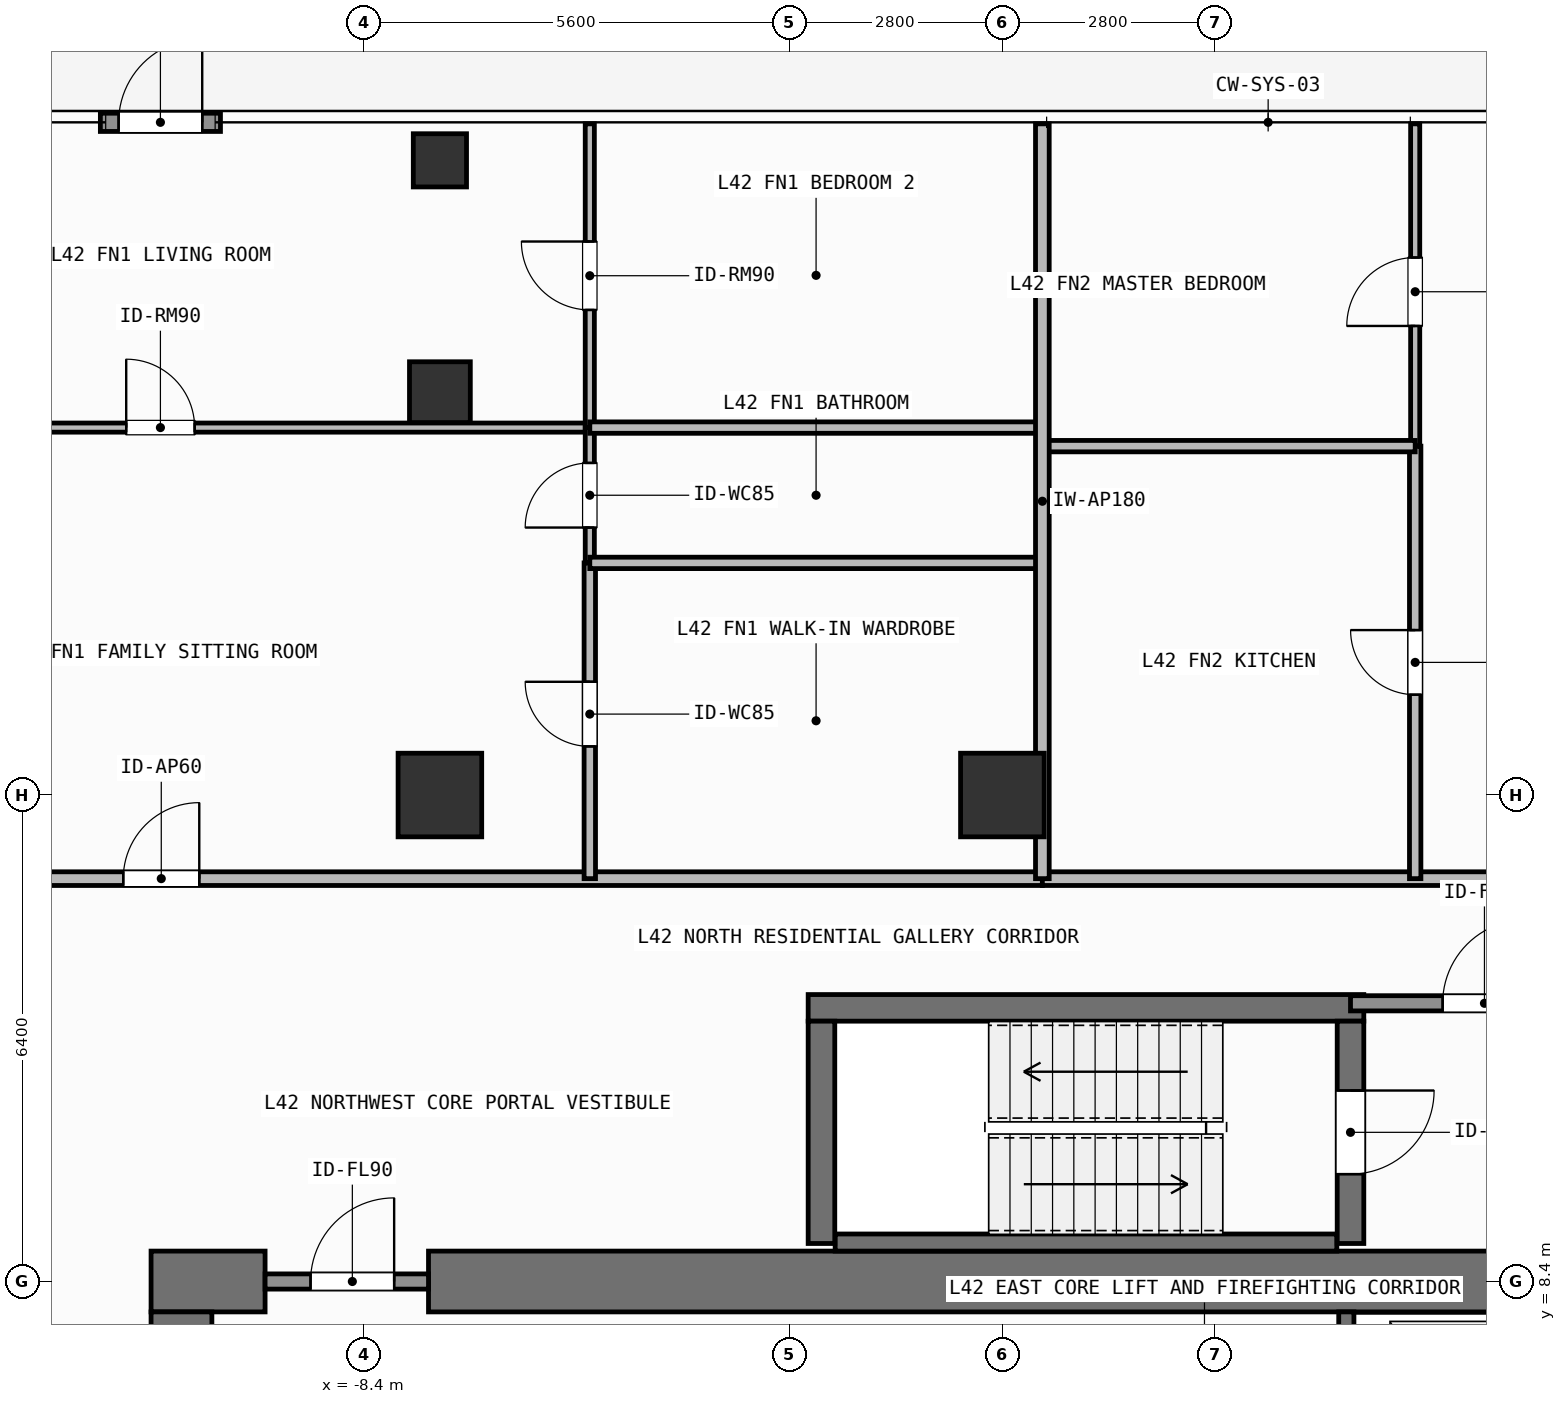
"""IFC4 building model, lengths in metres.
Left out: names, types, materials, properties, quantities, classifications, styles, units other than length and angle.
Written with IfcOpenShell. Run it as: python <this file> out.ifc"""

import sys

from ifc_helpers import new_model, si_unit, direction, frame, frame_2d, origin, origin_2d, place, context, subcontext, project, spatial, rectangle, hollow_rectangle, extrude, element, fill, save


model = new_model("IFC4")
c1 = context("Model", 3, precision=1e-05, world=origin(), true_north=direction((0.0, 1.0)))
c2 = subcontext(c1, "Body", "Model", "MODEL_VIEW")
j1 = project(units=[si_unit("LENGTHUNIT", "METRE"), si_unit("PLANEANGLEUNIT", "RADIAN")], contexts=[c1])
p1 = place(None, origin())
s1 = spatial("IfcSite", under=j1, at=p1, CompositionType="ELEMENT")
p2 = place(p1, origin())
s2 = spatial("IfcBuilding", under=s1, at=p2, CompositionType="ELEMENT")
p3 = place(p2, frame((0.0, 0.0, 171.9)))
s3 = spatial("IfcBuildingStorey", under=s2, at=p3, CompositionType="ELEMENT", Elevation=171.9)
p4 = place(p3, frame((-11.2, 8.4, 0.0), z_axis=(0.0, 0.0, 1.0), x_axis=(1.0, 0.0, 0.0)))
e1 = element("IfcWall", 1, at=p4, inside=s3, PredefinedType="SHEAR", context=c2, shape_type="SweptSolid", body=[
    extrude(rectangle(XDim=1.5, YDim=0.8, at=frame_2d((0.75, 0.0))), origin(), (0.0, 0.0, 1.0), 3.9),
])
p5 = place(p3, frame((-7.55, 8.4, 0.0), z_axis=(0.0, 0.0, 1.0), x_axis=(1.0, 0.0, 0.0)))
e2 = element("IfcWall", 2, at=p5, inside=s3, PredefinedType="SHEAR", context=c2, shape_type="SweptSolid", body=[
    extrude(rectangle(XDim=16.35, YDim=0.8, at=frame_2d((8.175, 0.0))), origin(), (0.0, 0.0, 1.0), 3.9),
])
p6 = place(p3, frame((-10.8, -8.0, 0.0), z_axis=(0.0, 0.0, 1.0), x_axis=(0.0, 1.0, 0.0)))
e3 = element("IfcWall", 3, at=p6, inside=s3, PredefinedType="SHEAR", context=c2, shape_type="SweptSolid", body=[
    extrude(rectangle(XDim=16.0, YDim=0.8, at=frame_2d((8.0, 0.0))), origin(), (0.0, 0.0, 1.0), 3.9),
])
p7 = place(p3, frame((-2.555, 12.0, 0.0), z_axis=(0.0, 0.0, 1.0), x_axis=(1.0, 0.0, 0.0)))
e4 = element("IfcWall", 4, at=p7, inside=s3, PredefinedType="SHEAR", context=c2, shape_type="SweptSolid", body=[
    extrude(rectangle(XDim=7.31, YDim=0.35, at=frame_2d((3.655, 0.0))), origin(), (0.0, 0.0, 1.0), 3.9),
])
p8 = place(p3, frame((-2.2, 8.913, 0.0), z_axis=(0.0, 0.0, 1.0), x_axis=(1.0, 0.0, 0.0)))
e5 = element("IfcWall", 5, at=p8, inside=s3, PredefinedType="SHEAR", context=c2, shape_type="SweptSolid", body=[
    extrude(rectangle(XDim=6.6, YDim=0.225, at=frame_2d((3.3, 0.0))), origin(), (0.0, 0.0, 1.0), 3.9),
])
p9 = place(p3, frame((-2.38, 8.9, 0.0), z_axis=(0.0, 0.0, 1.0), x_axis=(0.0, 1.0, 0.0)))
e6 = element("IfcWall", 6, at=p9, inside=s3, PredefinedType="SHEAR", context=c2, shape_type="SweptSolid", body=[
    extrude(rectangle(XDim=2.925, YDim=0.35, at=frame_2d((1.462, 0.0))), origin(), (0.0, 0.0, 1.0), 3.9),
])
p10 = place(p3, frame((4.58, 11.825, 0.0), z_axis=(0.0, 0.0, 1.0), x_axis=(0.0, -1.0, 0.0)))
e7 = element("IfcWall", 7, at=p10, inside=s3, PredefinedType="SHEAR", context=c2, shape_type="SweptSolid", body=[
    extrude(rectangle(XDim=2.925, YDim=0.35, at=frame_2d((1.462, 0.0))), origin(), (0.0, 0.0, 1.0), 3.9),
])
p11 = place(p10, frame((0.913, 0.0, 0.0)))
e8 = element("IfcOpeningElement", 8, at=p11, cuts=e7, PredefinedType="OPENING", context=c2, shape_type="SweptSolid", body=[
    extrude(rectangle(XDim=1.1, YDim=2.15, at=frame_2d((0.55, 1.075))), frame((0.0, 0.185, 0.0), z_axis=(0.0, -1.0, 0.0), x_axis=(1.0, 0.0, 0.0)), (0.0, 0.0, 1.0), 0.37),
])
for number, where, z_axis, x_axis in (
    (9, (-7.4, 14.8, 0.0), (0.0, 0.0, 1.0), (1.0, 0.0, 0.0)),
    (10, (0.0, 14.8, 0.0), (0.0, 0.0, 1.0), (1.0, 0.0, 0.0)),
):
    element("IfcColumn", number, at=place(p3, frame(where, z_axis=z_axis, x_axis=x_axis)), inside=s3, PredefinedType="COLUMN", context=c2, shape_type="SweptSolid", body=[
        extrude(rectangle(XDim=1.1, YDim=1.1, at=origin_2d()), origin(), (0.0, 0.0, 1.0), 3.9),
    ])
p12 = place(p3, frame((-7.4, 20.1, 0.0), z_axis=(0.0, 0.0, 1.0), x_axis=(1.0, 0.0, 0.0)))
e11 = element("IfcColumn", 11, at=p12, inside=s3, PredefinedType="COLUMN", context=c2, shape_type="SweptSolid", body=[
    extrude(hollow_rectangle(XDim=0.8, YDim=0.8, WallThickness=0.036, at=origin_2d()), origin(), (0.0, 0.0, 1.0), 3.9),
])
p13 = place(p3, frame((-7.4, 23.15, 0.0), z_axis=(0.0, 0.0, 1.0), x_axis=(1.0, 0.0, 0.0)))
e12 = element("IfcColumn", 12, at=p13, inside=s3, PredefinedType="COLUMN", context=c2, shape_type="SweptSolid", body=[
    extrude(hollow_rectangle(XDim=0.7, YDim=0.7, WallThickness=0.032, at=origin_2d()), origin(), (0.0, 0.0, 1.0), 3.9),
])
p14 = place(p3, frame((-11.867, 23.65, 0.0), z_axis=(0.0, 0.0, 1.0), x_axis=(1.0, 0.0, 0.0)))
e13 = element("IfcWall", 13, at=p14, inside=s3, PredefinedType="SOLIDWALL", context=c2, shape_type="SweptSolid", body=[
    extrude(rectangle(XDim=1.58, YDim=0.24, at=frame_2d((0.79, 0.0))), origin(), (0.0, 0.0, 1.0), 3.68),
])
p15 = place(p14, frame((0.24, 0.0, 0.0)))
e14 = element("IfcOpeningElement", 14, at=p15, cuts=e13, PredefinedType="OPENING", context=c2, shape_type="SweptSolid", body=[
    extrude(rectangle(XDim=1.1, YDim=2.2, at=frame_2d((0.55, 1.1))), frame((0.0, 0.13, 0.0), z_axis=(0.0, -1.0, 0.0), x_axis=(1.0, 0.0, 0.0)), (0.0, 0.0, 1.0), 0.26),
])
p16 = place(p3, frame((4.525, 5.825, 0.0), z_axis=(0.0, 0.0, 1.0), x_axis=(0.0, 1.0, 0.0)))
e15 = element("IfcWall", 15, at=p16, inside=s3, PredefinedType="SHEAR", context=c2, shape_type="SweptSolid", body=[
    extrude(rectangle(XDim=2.175, YDim=0.2, at=frame_2d((1.087, 0.0))), origin(), (0.0, 0.0, 1.0), 3.68),
])
p17 = place(p16, frame((0.425, 0.0, 0.0)))
e16 = element("IfcOpeningElement", 16, at=p17, cuts=e15, PredefinedType="OPENING", context=c2, shape_type="SweptSolid", body=[
    extrude(rectangle(XDim=1.1, YDim=2.2, at=frame_2d((0.55, 1.1))), frame((0.0, 0.11, 0.0), z_axis=(0.0, -1.0, 0.0), x_axis=(1.0, 0.0, 0.0)), (0.0, 0.0, 1.0), 0.22),
])
p18 = place(p3, frame((4.58, 12.06, 0.0), z_axis=(0.0, 0.0, 1.0), x_axis=(1.0, 0.0, 0.0)))
e17 = element("IfcWall", 17, at=p18, inside=s3, PredefinedType="SOLIDWALL", context=c2, shape_type="SweptSolid", body=[
    extrude(rectangle(XDim=3.7, YDim=0.2, at=frame_2d((1.85, 0.0))), origin(), (0.0, 0.0, 1.0), 3.68),
])
p19 = place(p18, frame((1.212, 0.0, 0.0)))
e18 = element("IfcOpeningElement", 18, at=p19, cuts=e17, PredefinedType="OPENING", context=c2, shape_type="SweptSolid", body=[
    extrude(rectangle(XDim=1.1, YDim=2.15, at=frame_2d((0.55, 1.075))), frame((0.0, 0.11, 0.0), z_axis=(0.0, -1.0, 0.0), x_axis=(1.0, 0.0, 0.0)), (0.0, 0.0, 1.0), 0.22),
])
p20 = place(p3, frame((-9.7, 8.4, 0.0), z_axis=(0.0, 0.0, 1.0), x_axis=(1.0, 0.0, 0.0)))
e19 = element("IfcWall", 19, at=p20, inside=s3, PredefinedType="SOLIDWALL", context=c2, shape_type="SweptSolid", body=[
    extrude(rectangle(XDim=2.15, YDim=0.2, at=frame_2d((1.075, 0.0))), origin(), (0.0, 0.0, 1.0), 2.82),
])
p21 = place(p20, frame((0.598, 0.0, 0.0)))
e20 = element("IfcOpeningElement", 20, at=p21, cuts=e19, PredefinedType="OPENING", context=c2, shape_type="SweptSolid", body=[
    extrude(rectangle(XDim=1.1, YDim=2.15, at=frame_2d((0.55, 1.075))), frame((0.0, 0.11, 0.0), z_axis=(0.0, -1.0, 0.0), x_axis=(1.0, 0.0, 0.0)), (0.0, 0.0, 1.0), 0.22),
])
p22 = place(p3, frame((-22.12, 13.7, 0.0), z_axis=(0.0, 0.0, 1.0), x_axis=(1.0, 0.0, 0.0)))
e21 = element("IfcWall", 21, at=p22, inside=s3, PredefinedType="PARTITIONING", context=c2, shape_type="SweptSolid", body=[
    extrude(rectangle(XDim=22.646, YDim=0.18, at=frame_2d((11.323, 0.0))), origin(), (0.0, 0.0, 1.0), 3.68),
])
p23 = place(p22, frame((10.554, 0.0, 0.0)))
e22 = element("IfcOpeningElement", 22, at=p23, cuts=e21, PredefinedType="OPENING", context=c2, shape_type="SweptSolid", body=[
    extrude(rectangle(XDim=1.0, YDim=2.2, at=frame_2d((0.5, 1.1))), frame((0.0, 0.1, 0.0), z_axis=(0.0, -1.0, 0.0), x_axis=(1.0, 0.0, 0.0)), (0.0, 0.0, 1.0), 0.2),
])
p24 = place(p3, frame((-16.726, 19.634, 0.0), z_axis=(0.0, 0.0, 1.0), x_axis=(1.0, 0.0, 0.0)))
e23 = element("IfcWall", 23, at=p24, inside=s3, PredefinedType="PARTITIONING", context=c2, shape_type="SweptSolid", body=[
    extrude(rectangle(XDim=11.298, YDim=0.12, at=frame_2d((5.649, 0.0))), origin(), (0.0, 0.0, 1.0), 3.68),
])
p25 = place(p24, frame((5.199, 0.0, 0.0)))
e24 = element("IfcOpeningElement", 24, at=p25, cuts=e23, PredefinedType="OPENING", context=c2, shape_type="SweptSolid", body=[
    extrude(rectangle(XDim=0.9, YDim=2.1, at=frame_2d((0.45, 1.05))), frame((0.0, 0.07, 0.0), z_axis=(0.0, -1.0, 0.0), x_axis=(1.0, 0.0, 0.0)), (0.0, 0.0, 1.0), 0.14),
])
p26 = place(p3, frame((-5.428, 13.7, 0.0), z_axis=(0.0, 0.0, 1.0), x_axis=(0.0, 1.0, 0.0)))
e25 = element("IfcWall", 25, at=p26, inside=s3, PredefinedType="PARTITIONING", context=c2, shape_type="SweptSolid", body=[
    extrude(rectangle(XDim=4.154, YDim=0.15, at=frame_2d((2.077, 0.0))), origin(), (0.0, 0.0, 1.0), 3.68),
])
p27 = place(p26, frame((1.74, 0.0, 0.0)))
e26 = element("IfcOpeningElement", 26, at=p27, cuts=e25, PredefinedType="OPENING", context=c2, shape_type="SweptSolid", body=[
    extrude(rectangle(XDim=0.85, YDim=2.1, at=frame_2d((0.425, 1.05))), frame((0.0, 0.085, 0.0), z_axis=(0.0, -1.0, 0.0), x_axis=(1.0, 0.0, 0.0)), (0.0, 0.0, 1.0), 0.17),
])
p28 = place(p3, frame((-5.428, 17.854, 0.0), z_axis=(0.0, 0.0, 1.0), x_axis=(0.0, 1.0, 0.0)))
e27 = element("IfcWall", 27, at=p28, inside=s3, PredefinedType="PARTITIONING", context=c2, shape_type="SweptSolid", body=[
    extrude(rectangle(XDim=1.78, YDim=0.12, at=frame_2d((0.89, 0.0))), origin(), (0.0, 0.0, 1.0), 3.68),
])
p29 = place(p28, frame((0.465, 0.0, 0.0)))
e28 = element("IfcOpeningElement", 28, at=p29, cuts=e27, PredefinedType="OPENING", context=c2, shape_type="SweptSolid", body=[
    extrude(rectangle(XDim=0.85, YDim=2.1, at=frame_2d((0.425, 1.05))), frame((0.0, 0.07, 0.0), z_axis=(0.0, -1.0, 0.0), x_axis=(1.0, 0.0, 0.0)), (0.0, 0.0, 1.0), 0.14),
])
p30 = place(p3, frame((-5.428, 19.634, 0.0), z_axis=(0.0, 0.0, 1.0), x_axis=(0.0, 1.0, 0.0)))
e29 = element("IfcWall", 29, at=p30, inside=s3, PredefinedType="PARTITIONING", context=c2, shape_type="SweptSolid", body=[
    extrude(rectangle(XDim=3.996, YDim=0.12, at=frame_2d((1.998, 0.0))), origin(), (0.0, 0.0, 1.0), 3.68),
])
p31 = place(p30, frame((1.548, 0.0, 0.0)))
e30 = element("IfcOpeningElement", 30, at=p31, cuts=e29, PredefinedType="OPENING", context=c2, shape_type="SweptSolid", body=[
    extrude(rectangle(XDim=0.9, YDim=2.1, at=frame_2d((0.45, 1.05))), frame((0.0, 0.07, 0.0), z_axis=(0.0, -1.0, 0.0), x_axis=(1.0, 0.0, 0.0)), (0.0, 0.0, 1.0), 0.14),
])
p32 = place(p3, frame((0.526, 13.7, 0.0), z_axis=(0.0, 0.0, 1.0), x_axis=(1.0, 0.0, 0.0)))
e31 = element("IfcWall", 31, at=p32, inside=s3, PredefinedType="PARTITIONING", context=c2, shape_type="SweptSolid", body=[
    extrude(rectangle(XDim=17.794, YDim=0.18, at=frame_2d((8.897, 0.0))), origin(), (0.0, 0.0, 1.0), 3.68),
])
p33 = place(p32, frame((8.039, 0.0, 0.0)))
e32 = element("IfcOpeningElement", 32, at=p33, cuts=e31, PredefinedType="OPENING", context=c2, shape_type="SweptSolid", body=[
    extrude(rectangle(XDim=1.0, YDim=2.2, at=frame_2d((0.5, 1.1))), frame((0.0, 0.1, 0.0), z_axis=(0.0, -1.0, 0.0), x_axis=(1.0, 0.0, 0.0)), (0.0, 0.0, 1.0), 0.2),
])
p34 = place(p3, frame((5.431, 13.7, 0.0), z_axis=(0.0, 0.0, 1.0), x_axis=(0.0, 1.0, 0.0)))
e33 = element("IfcWall", 33, at=p34, inside=s3, PredefinedType="PARTITIONING", context=c2, shape_type="SweptSolid", body=[
    extrude(rectangle(XDim=5.69, YDim=0.15, at=frame_2d((2.845, 0.0))), origin(), (0.0, 0.0, 1.0), 3.68),
])
p35 = place(p34, frame((2.42, 0.0, 0.0)))
e34 = element("IfcOpeningElement", 34, at=p35, cuts=e33, PredefinedType="OPENING", context=c2, shape_type="SweptSolid", body=[
    extrude(rectangle(XDim=0.85, YDim=2.1, at=frame_2d((0.425, 1.05))), frame((0.0, 0.085, 0.0), z_axis=(0.0, -1.0, 0.0), x_axis=(1.0, 0.0, 0.0)), (0.0, 0.0, 1.0), 0.17),
])
p36 = place(p3, frame((5.431, 19.39, 0.0), z_axis=(0.0, 0.0, 1.0), x_axis=(0.0, 1.0, 0.0)))
e35 = element("IfcWall", 35, at=p36, inside=s3, PredefinedType="PARTITIONING", context=c2, shape_type="SweptSolid", body=[
    extrude(rectangle(XDim=4.24, YDim=0.12, at=frame_2d((2.12, 0.0))), origin(), (0.0, 0.0, 1.0), 3.68),
])
p37 = place(p36, frame((1.581, 0.0, 0.0)))
e36 = element("IfcOpeningElement", 36, at=p37, cuts=e35, PredefinedType="OPENING", context=c2, shape_type="SweptSolid", body=[
    extrude(rectangle(XDim=0.9, YDim=2.1, at=frame_2d((0.45, 1.05))), frame((0.0, 0.07, 0.0), z_axis=(0.0, -1.0, 0.0), x_axis=(1.0, 0.0, 0.0)), (0.0, 0.0, 1.0), 0.14),
])
for number, where, z_axis, x_axis in (
    (37, (-5.428, 17.854, 0.0), (0.0, 0.0, 1.0), (1.0, 0.0, 0.0)),
    (38, (-5.428, 19.634, 0.0), (0.0, 0.0, 1.0), (1.0, 0.0, 0.0)),
):
    element("IfcWall", number, at=place(p3, frame(where, z_axis=z_axis, x_axis=x_axis)), inside=s3, PredefinedType="PARTITIONING", context=c2, shape_type="SweptSolid", body=[
        extrude(rectangle(XDim=5.954, YDim=0.15, at=frame_2d((2.977, 0.0))), origin(), (0.0, 0.0, 1.0), 3.68),
    ])
p38 = place(p3, frame((0.526, 19.39, 0.0), z_axis=(0.0, 0.0, 1.0), x_axis=(1.0, 0.0, 0.0)))
e39 = element("IfcWall", 39, at=p38, inside=s3, PredefinedType="PARTITIONING", context=c2, shape_type="SweptSolid", body=[
    extrude(rectangle(XDim=4.905, YDim=0.15, at=frame_2d((2.453, 0.0))), origin(), (0.0, 0.0, 1.0), 3.68),
])
p39 = place(p3, frame((0.526, 13.7, 0.0), z_axis=(0.0, 0.0, 1.0), x_axis=(0.0, 1.0, 0.0)))
e40 = element("IfcWall", 40, at=p39, inside=s3, PredefinedType="PARTITIONING", context=c2, shape_type="SweptSolid", body=[
    extrude(rectangle(XDim=9.93, YDim=0.18, at=frame_2d((4.965, 0.0))), origin(), (0.0, 0.0, 1.0), 3.68),
])
p40 = place(p15, origin())
e41 = element("IfcDoor", 41, at=p40, inside=s3, OperationType="SINGLE_SWING_RIGHT", PredefinedType="DOOR", context=c2, shape_type="SweptSolid", body=[
    extrude(rectangle(XDim=1.1, YDim=2.2, at=frame_2d((0.55, 1.1))), frame((0.0, 0.025, 0.0), z_axis=(0.0, -1.0, 0.0), x_axis=(1.0, 0.0, 0.0)), (0.0, 0.0, 1.0), 0.05),
])
fill(e14, e41)
p41 = place(p11, origin())
e42 = element("IfcDoor", 42, at=p41, inside=s3, OperationType="SINGLE_SWING_LEFT", PredefinedType="DOOR", context=c2, shape_type="SweptSolid", body=[
    extrude(rectangle(XDim=1.1, YDim=2.15, at=frame_2d((0.55, 1.075))), frame((0.0, 0.025, 0.0), z_axis=(0.0, -1.0, 0.0), x_axis=(1.0, 0.0, 0.0)), (0.0, 0.0, 1.0), 0.05),
])
fill(e8, e42)
p42 = place(p19, origin())
e43 = element("IfcDoor", 43, at=p42, inside=s3, OperationType="SINGLE_SWING_RIGHT", PredefinedType="DOOR", context=c2, shape_type="SweptSolid", body=[
    extrude(rectangle(XDim=1.1, YDim=2.15, at=frame_2d((0.55, 1.075))), frame((0.0, 0.025, 0.0), z_axis=(0.0, -1.0, 0.0), x_axis=(1.0, 0.0, 0.0)), (0.0, 0.0, 1.0), 0.05),
])
fill(e18, e43)
p43 = place(p21, origin())
e44 = element("IfcDoor", 44, at=p43, inside=s3, OperationType="SINGLE_SWING_RIGHT", PredefinedType="DOOR", context=c2, shape_type="SweptSolid", body=[
    extrude(rectangle(XDim=1.1, YDim=2.15, at=frame_2d((0.55, 1.075))), frame((0.0, 0.025, 0.0), z_axis=(0.0, -1.0, 0.0), x_axis=(1.0, 0.0, 0.0)), (0.0, 0.0, 1.0), 0.05),
])
fill(e20, e44)
p44 = place(p23, origin())
e45 = element("IfcDoor", 45, at=p44, inside=s3, OperationType="SINGLE_SWING_RIGHT", PredefinedType="DOOR", context=c2, shape_type="SweptSolid", body=[
    extrude(rectangle(XDim=1.0, YDim=2.2, at=frame_2d((0.5, 1.1))), frame((0.0, 0.025, 0.0), z_axis=(0.0, -1.0, 0.0), x_axis=(1.0, 0.0, 0.0)), (0.0, 0.0, 1.0), 0.05),
])
fill(e22, e45)
p45 = place(p25, origin())
e46 = element("IfcDoor", 46, at=p45, inside=s3, OperationType="SINGLE_SWING_LEFT", PredefinedType="DOOR", context=c2, shape_type="SweptSolid", body=[
    extrude(rectangle(XDim=0.9, YDim=2.1, at=frame_2d((0.45, 1.05))), frame((0.0, 0.025, 0.0), z_axis=(0.0, -1.0, 0.0), x_axis=(1.0, 0.0, 0.0)), (0.0, 0.0, 1.0), 0.05),
])
fill(e24, e46)
p46 = place(p27, origin())
e47 = element("IfcDoor", 47, at=p46, inside=s3, OperationType="SINGLE_SWING_RIGHT", PredefinedType="DOOR", context=c2, shape_type="SweptSolid", body=[
    extrude(rectangle(XDim=0.85, YDim=2.1, at=frame_2d((0.425, 1.05))), frame((0.0, 0.025, 0.0), z_axis=(0.0, -1.0, 0.0), x_axis=(1.0, 0.0, 0.0)), (0.0, 0.0, 1.0), 0.05),
])
fill(e26, e47)
p47 = place(p29, origin())
e48 = element("IfcDoor", 48, at=p47, inside=s3, OperationType="SINGLE_SWING_LEFT", PredefinedType="DOOR", context=c2, shape_type="SweptSolid", body=[
    extrude(rectangle(XDim=0.85, YDim=2.1, at=frame_2d((0.425, 1.05))), frame((0.0, 0.025, 0.0), z_axis=(0.0, -1.0, 0.0), x_axis=(1.0, 0.0, 0.0)), (0.0, 0.0, 1.0), 0.05),
])
fill(e28, e48)
p48 = place(p31, origin())
e49 = element("IfcDoor", 49, at=p48, inside=s3, OperationType="SINGLE_SWING_RIGHT", PredefinedType="DOOR", context=c2, shape_type="SweptSolid", body=[
    extrude(rectangle(XDim=0.9, YDim=2.1, at=frame_2d((0.45, 1.05))), frame((0.0, 0.025, 0.0), z_axis=(0.0, -1.0, 0.0), x_axis=(1.0, 0.0, 0.0)), (0.0, 0.0, 1.0), 0.05),
])
fill(e30, e49)
p49 = place(p35, origin())
e50 = element("IfcDoor", 50, at=p49, inside=s3, OperationType="SINGLE_SWING_RIGHT", PredefinedType="DOOR", context=c2, shape_type="SweptSolid", body=[
    extrude(rectangle(XDim=0.85, YDim=2.1, at=frame_2d((0.425, 1.05))), frame((0.0, 0.025, 0.0), z_axis=(0.0, -1.0, 0.0), x_axis=(1.0, 0.0, 0.0)), (0.0, 0.0, 1.0), 0.05),
])
fill(e34, e50)
p50 = place(p37, origin())
e51 = element("IfcDoor", 51, at=p50, inside=s3, OperationType="SINGLE_SWING_LEFT", PredefinedType="DOOR", context=c2, shape_type="SweptSolid", body=[
    extrude(rectangle(XDim=0.9, YDim=2.1, at=frame_2d((0.45, 1.05))), frame((0.0, 0.025, 0.0), z_axis=(0.0, -1.0, 0.0), x_axis=(1.0, 0.0, 0.0)), (0.0, 0.0, 1.0), 0.05),
])
fill(e36, e51)
save(model, sys.argv[1])
